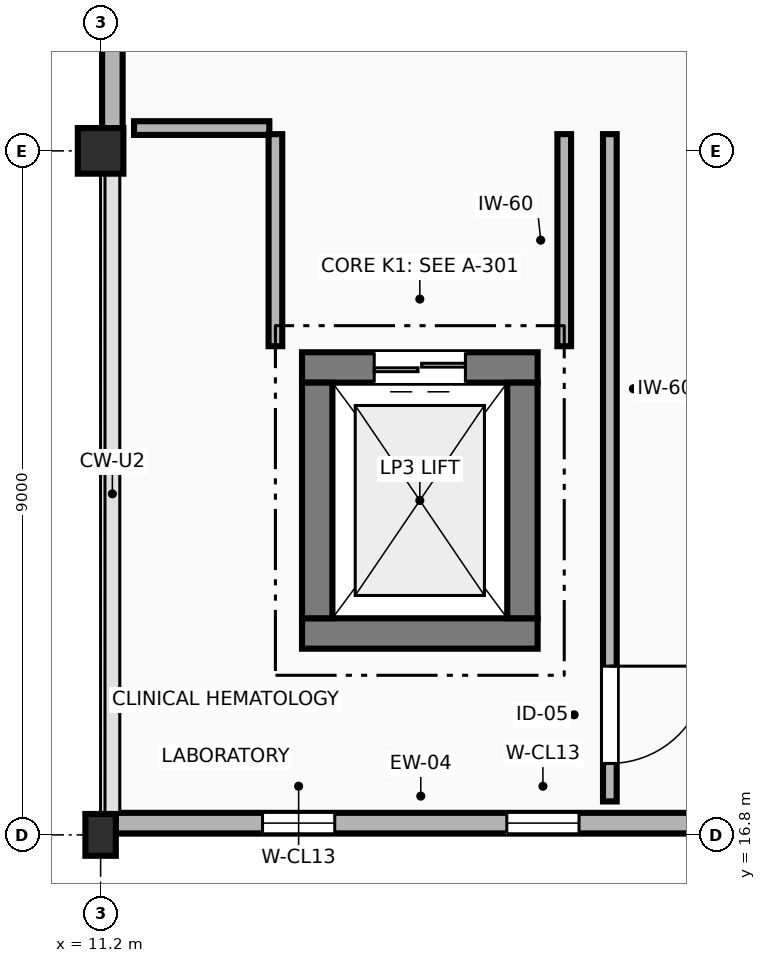
"""IFC4 building model, lengths in metres.
Left out: names, types, materials, properties, quantities, classifications, styles, units other than length and angle.
Written with IfcOpenShell. Run it as: python <this file> out.ifc"""

import sys

from ifc_helpers import new_model, si_unit, direction, frame, frame_2d, origin, origin_2d, place, context, subcontext, project, spatial, rectangle, extrude, element, fill, save


model = new_model("IFC4")
c1 = context("Model", 3, precision=1e-05, world=origin(), true_north=direction((0.0, 1.0)))
c2 = subcontext(c1, "Body", "Model", "MODEL_VIEW")
j1 = project(units=[si_unit("LENGTHUNIT", "METRE"), si_unit("PLANEANGLEUNIT", "RADIAN")], contexts=[c1])
p1 = place(None, origin())
s1 = spatial("IfcSite", under=j1, at=p1, CompositionType="ELEMENT")
p2 = place(p1, origin())
s2 = spatial("IfcBuilding", under=s1, at=p2, CompositionType="ELEMENT")
p3 = place(p2, frame((0.0, 0.0, 9.6)))
s3 = spatial("IfcBuildingStorey", under=s2, at=p3, CompositionType="ELEMENT", Elevation=9.6)
p4 = place(p3, frame((11.2, 16.8, 0.0), z_axis=(0.0, 0.0, 1.0), x_axis=(1.0, 0.0, 0.0)))
e1 = element("IfcColumn", 1, at=p4, inside=s3, PredefinedType="COLUMN", context=c2, shape_type="SweptSolid", body=[
    extrude(rectangle(XDim=0.4, YDim=0.55, at=origin_2d()), origin(), (0.0, 0.0, 1.0), 4.2),
])
p5 = place(p3, frame((11.2, 25.8, 0.0), z_axis=(0.0, 0.0, 1.0), x_axis=(1.0, 0.0, 0.0)))
e2 = element("IfcColumn", 2, at=p5, inside=s3, PredefinedType="COLUMN", context=c2, shape_type="SweptSolid", body=[
    extrude(rectangle(XDim=0.6, YDim=0.6, at=origin_2d()), origin(), (0.0, 0.0, 1.0), 4.2),
])
p6 = place(p3, frame((11.395, 16.955, 0.0), z_axis=(0.0, 0.0, 1.0), x_axis=(1.0, 0.0, 0.0)))
e3 = element("IfcWall", 3, at=p6, inside=s3, PredefinedType="STANDARD", context=c2, shape_type="SweptSolid", body=[
    extrude(rectangle(XDim=8.035, YDim=0.27, at=frame_2d((4.018, 0.0))), origin(), (0.0, 0.0, 1.0), 3.255),
])
p7 = place(p6, frame((1.936, 0.0, 0.95)))
e4 = element("IfcOpeningElement", 4, at=p7, cuts=e3, PredefinedType="OPENING", context=c2, shape_type="SweptSolid", body=[
    extrude(rectangle(XDim=0.95, YDim=1.3, at=frame_2d((0.475, 0.65))), frame((0.0, 0.145, 0.0), z_axis=(0.0, -1.0, 0.0), x_axis=(1.0, 0.0, 0.0)), (0.0, 0.0, 1.0), 0.29),
])
p8 = place(p6, frame((5.149, 0.0, 0.95)))
e5 = element("IfcOpeningElement", 5, at=p8, cuts=e3, PredefinedType="OPENING", context=c2, shape_type="SweptSolid", body=[
    extrude(rectangle(XDim=0.95, YDim=1.3, at=frame_2d((0.475, 0.65))), frame((0.0, 0.145, 0.0), z_axis=(0.0, -1.0, 0.0), x_axis=(1.0, 0.0, 0.0)), (0.0, 0.0, 1.0), 0.29),
])
p9 = place(p3, frame((11.355, 34.355, 0.0), z_axis=(0.0, 0.0, 1.0), x_axis=(0.0, -1.0, 0.0)))
e6 = element("IfcWall", 6, at=p9, inside=s3, PredefinedType="STANDARD", context=c2, shape_type="SweptSolid", body=[
    extrude(rectangle(XDim=8.26, YDim=0.27, at=frame_2d((4.13, 0.0))), origin(), (0.0, 0.0, 1.0), 3.365),
])
p10 = place(p3, frame((13.85, 19.45, 0.0), z_axis=(0.0, 0.0, 1.0), x_axis=(1.0, 0.0, 0.0)))
e7 = element("IfcWall", 7, at=p10, inside=s3, PredefinedType="SHEAR", context=c2, shape_type="SweptSolid", body=[
    extrude(rectangle(XDim=3.1, YDim=0.4, at=frame_2d((1.55, 0.0))), origin(), (0.0, 0.0, 1.0), 4.2),
])
p11 = place(p3, frame((16.95, 22.95, 0.0), z_axis=(0.0, 0.0, 1.0), x_axis=(-1.0, 0.0, 0.0)))
e8 = element("IfcWall", 8, at=p11, inside=s3, PredefinedType="SHEAR", context=c2, shape_type="SweptSolid", body=[
    extrude(rectangle(XDim=3.1, YDim=0.4, at=frame_2d((1.55, 0.0))), origin(), (0.0, 0.0, 1.0), 4.2),
])
p12 = place(p11, frame((0.95, 0.0, 0.0)))
e9 = element("IfcOpeningElement", 9, at=p12, cuts=e8, PredefinedType="OPENING", context=c2, shape_type="SweptSolid", body=[
    extrude(rectangle(XDim=1.2, YDim=2.2, at=frame_2d((0.6, 1.1))), frame((0.0, 0.21, 0.0), z_axis=(0.0, -1.0, 0.0), x_axis=(1.0, 0.0, 0.0)), (0.0, 0.0, 1.0), 0.42),
])
for number, where, z_axis, x_axis in (
    (10, (14.05, 19.65, 0.0), (0.0, 0.0, 1.0), (0.0, 1.0, 0.0)),
    (11, (16.75, 22.75, 0.0), (0.0, 0.0, 1.0), (0.0, -1.0, 0.0)),
):
    element("IfcWall", number, at=place(p3, frame(where, z_axis=z_axis, x_axis=x_axis)), inside=s3, PredefinedType="SHEAR", context=c2, shape_type="SweptSolid", body=[
        extrude(rectangle(XDim=3.1, YDim=0.4, at=frame_2d((1.55, 0.0))), origin(), (0.0, 0.0, 1.0), 4.2),
    ])
p13 = place(p3, frame((17.3, 23.23, 0.0), z_axis=(0.0, 0.0, 1.0), x_axis=(0.0, 1.0, 0.0)))
e12 = element("IfcWall", 12, at=p13, inside=s3, PredefinedType="PARTITIONING", context=c2, shape_type="SweptSolid", body=[
    extrude(rectangle(XDim=2.79, YDim=0.18, at=frame_2d((1.395, 0.0))), origin(), (0.0, 0.0, 1.0), 3.92),
])
p14 = place(p3, frame((17.9, 26.02, 0.0), z_axis=(0.0, 0.0, 1.0), x_axis=(0.0, -1.0, 0.0)))
e13 = element("IfcWall", 13, at=p14, inside=s3, PredefinedType="PARTITIONING", context=c2, shape_type="SweptSolid", body=[
    extrude(rectangle(XDim=8.78, YDim=0.18, at=frame_2d((4.39, 0.0))), origin(), (0.0, 0.0, 1.0), 3.92),
])
p15 = place(p14, frame((7.0, 0.0, 0.0)))
e14 = element("IfcOpeningElement", 14, at=p15, cuts=e13, PredefinedType="OPENING", context=c2, shape_type="SweptSolid", body=[
    extrude(rectangle(XDim=1.28, YDim=2.25, at=frame_2d((0.64, 1.125))), frame((0.0, 0.1, 0.0), z_axis=(0.0, -1.0, 0.0), x_axis=(1.0, 0.0, 0.0)), (0.0, 0.0, 1.0), 0.2),
])
p16 = place(p3, frame((11.64, 26.1, 0.0), z_axis=(0.0, 0.0, 1.0), x_axis=(1.0, 0.0, 0.0)))
e15 = element("IfcWall", 15, at=p16, inside=s3, PredefinedType="PARTITIONING", context=c2, shape_type="SweptSolid", body=[
    extrude(rectangle(XDim=1.78, YDim=0.18, at=frame_2d((0.89, 0.0))), origin(), (0.0, 0.0, 1.0), 3.255),
])
p17 = place(p3, frame((13.5, 26.02, 0.0), z_axis=(0.0, 0.0, 1.0), x_axis=(0.0, -1.0, 0.0)))
e16 = element("IfcWall", 16, at=p17, inside=s3, PredefinedType="PARTITIONING", context=c2, shape_type="SweptSolid", body=[
    extrude(rectangle(XDim=2.79, YDim=0.18, at=frame_2d((1.395, 0.0))), origin(), (0.0, 0.0, 1.0), 3.92),
])
p18 = place(p7, origin())
e17 = element("IfcWindow", 17, at=p18, inside=s3, PartitioningType="SINGLE_PANEL", PredefinedType="WINDOW", context=c2, shape_type="SweptSolid", body=[
    extrude(rectangle(XDim=0.95, YDim=1.3, at=frame_2d((0.475, 0.65))), frame((0.0, 0.03, 0.0), z_axis=(0.0, -1.0, 0.0), x_axis=(1.0, 0.0, 0.0)), (0.0, 0.0, 1.0), 0.06),
])
fill(e4, e17)
p19 = place(p8, origin())
e18 = element("IfcWindow", 18, at=p19, inside=s3, PartitioningType="SINGLE_PANEL", PredefinedType="WINDOW", context=c2, shape_type="SweptSolid", body=[
    extrude(rectangle(XDim=0.95, YDim=1.3, at=frame_2d((0.475, 0.65))), frame((0.0, 0.03, 0.0), z_axis=(0.0, -1.0, 0.0), x_axis=(1.0, 0.0, 0.0)), (0.0, 0.0, 1.0), 0.06),
])
fill(e5, e18)
p20 = place(p12, origin())
e19 = element("IfcDoor", 19, at=p20, inside=s3, OperationType="DOUBLE_DOOR_SLIDING", PredefinedType="DOOR", context=c2, shape_type="SweptSolid", body=[
    extrude(rectangle(XDim=1.2, YDim=2.2, at=frame_2d((0.6, 1.1))), frame((0.0, 0.025, 0.0), z_axis=(0.0, -1.0, 0.0), x_axis=(1.0, 0.0, 0.0)), (0.0, 0.0, 1.0), 0.05),
])
fill(e9, e19)
p21 = place(p15, origin())
e20 = element("IfcDoor", 20, at=p21, inside=s3, OperationType="SINGLE_SWING_LEFT", PredefinedType="DOOR", context=c2, shape_type="SweptSolid", body=[
    extrude(rectangle(XDim=1.28, YDim=2.25, at=frame_2d((0.64, 1.125))), frame((0.0, 0.025, 0.0), z_axis=(0.0, -1.0, 0.0), x_axis=(1.0, 0.0, 0.0)), (0.0, 0.0, 1.0), 0.05),
])
fill(e14, e20)
save(model, sys.argv[1])
